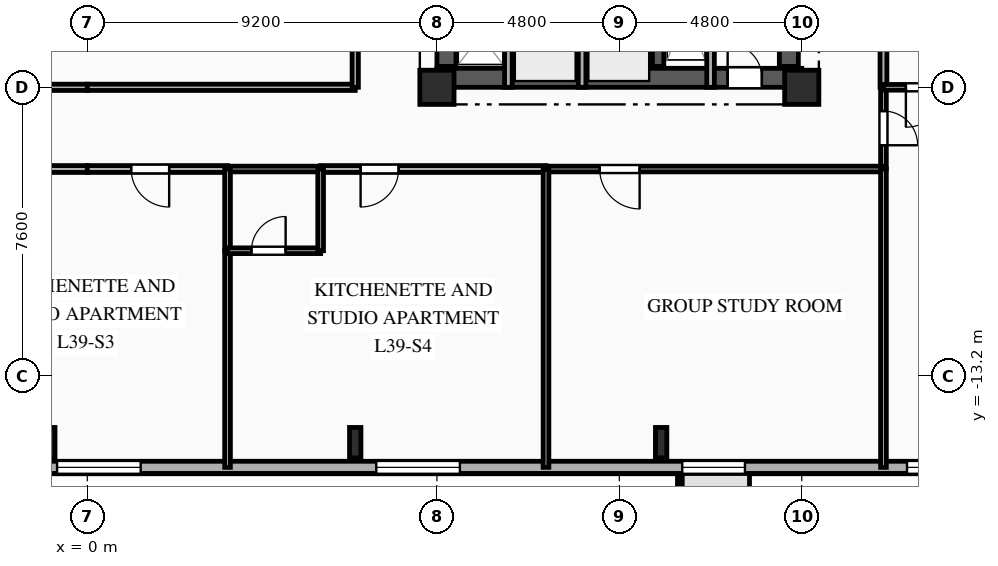
"""IFC4 building model, lengths in metres.
Left out: names, types, materials, properties, quantities, classifications, styles, units other than length and angle.
Written with IfcOpenShell. Run it as: python <this file> out.ifc"""

import sys

from ifc_helpers import new_model, si_unit, direction, frame, frame_2d, origin, origin_2d, place, context, subcontext, project, spatial, rectangle, i_section, extrude, element, fill, save


model = new_model("IFC4")
c1 = context("Model", 3, precision=1e-05, world=origin(), true_north=direction((0.0, 1.0)))
c2 = subcontext(c1, "Body", "Model", "MODEL_VIEW")
j1 = project(units=[si_unit("LENGTHUNIT", "METRE"), si_unit("PLANEANGLEUNIT", "RADIAN")], contexts=[c1])
p1 = place(None, origin())
s1 = spatial("IfcSite", under=j1, at=p1, CompositionType="ELEMENT")
p2 = place(p1, origin())
s2 = spatial("IfcBuilding", under=s1, at=p2, CompositionType="ELEMENT")
p3 = place(p2, frame((0.0, 0.0, 141.05)))
s3 = spatial("IfcBuildingStorey", under=s2, at=p3, CompositionType="ELEMENT", Elevation=141.05)
for number, where, z_axis, x_axis in (
    (1, (9.2, -5.6, 0.0), (0.0, 0.0, 1.0), (1.0, 0.0, 0.0)),
    (2, (18.8, -5.6, 0.0), (0.0, 0.0, 1.0), (1.0, 0.0, 0.0)),
):
    element("IfcColumn", number, at=place(p3, frame(where, z_axis=z_axis, x_axis=x_axis)), inside=s3, PredefinedType="COLUMN", context=c2, shape_type="SweptSolid", body=[
        extrude(rectangle(XDim=0.9, YDim=0.9, at=origin_2d()), origin(), (0.0, 0.0, 1.0), 3.35),
    ])
for number, where, z_axis, x_axis in (
    (3, (-1.0, -14.95, 0.0), (0.0, 0.0, 1.0), (1.0, 0.0, 0.0)),
    (4, (7.05, -14.95, 0.0), (0.0, 0.0, 1.0), (1.0, 0.0, 0.0)),
    (5, (15.1, -14.95, 0.0), (0.0, 0.0, 1.0), (1.0, 0.0, 0.0)),
):
    element("IfcColumn", number, at=place(p3, frame(where, z_axis=z_axis, x_axis=x_axis)), inside=s3, PredefinedType="COLUMN", context=c2, shape_type="SweptSolid", body=[
        extrude(i_section(OverallWidth=0.3, OverallDepth=0.8, WebThickness=0.018, FlangeThickness=0.033, FilletRadius=0.03, at=origin_2d()), origin(), (0.0, 0.0, 1.0), 3.35),
    ])
p4 = place(p3, frame((23.8, -15.6, 0.0), z_axis=(0.0, 0.0, 1.0), x_axis=(-1.0, 0.0, 0.0)))
e6 = element("IfcWall", 6, at=p4, inside=s3, PredefinedType="SOLIDWALL", context=c2, shape_type="SweptSolid", body=[
    extrude(rectangle(XDim=49.6, YDim=0.32, at=frame_2d((24.8, 0.0))), origin(), (0.0, 0.0, 1.0), 3.04),
])
p5 = place(p4, frame((1.13, 0.0, 0.85)))
e7 = element("IfcOpeningElement", 7, at=p5, cuts=e6, PredefinedType="OPENING", context=c2, shape_type="SweptSolid", body=[
    extrude(rectangle(XDim=1.1, YDim=1.85, at=frame_2d((0.55, 0.925))), frame((0.0, 0.17, 0.0), z_axis=(0.0, -1.0, 0.0), x_axis=(1.0, 0.0, 0.0)), (0.0, 0.0, 1.0), 0.34),
])
p6 = place(p4, frame((6.495, 0.0, 0.85)))
e8 = element("IfcOpeningElement", 8, at=p6, cuts=e6, PredefinedType="OPENING", context=c2, shape_type="SweptSolid", body=[
    extrude(rectangle(XDim=1.65, YDim=1.85, at=frame_2d((0.825, 0.925))), frame((0.0, 0.17, 0.0), z_axis=(0.0, -1.0, 0.0), x_axis=(1.0, 0.0, 0.0)), (0.0, 0.0, 1.0), 0.34),
])
p7 = place(p4, frame((13.996, 0.0, 0.85)))
e9 = element("IfcOpeningElement", 9, at=p7, cuts=e6, PredefinedType="OPENING", context=c2, shape_type="SweptSolid", body=[
    extrude(rectangle(XDim=2.2, YDim=1.85, at=frame_2d((1.1, 0.925))), frame((0.0, 0.17, 0.0), z_axis=(0.0, -1.0, 0.0), x_axis=(1.0, 0.0, 0.0)), (0.0, 0.0, 1.0), 0.34),
])
p8 = place(p4, frame((22.396, 0.0, 0.85)))
e10 = element("IfcOpeningElement", 10, at=p8, cuts=e6, PredefinedType="OPENING", context=c2, shape_type="SweptSolid", body=[
    extrude(rectangle(XDim=2.2, YDim=1.85, at=frame_2d((1.1, 0.925))), frame((0.0, 0.17, 0.0), z_axis=(0.0, -1.0, 0.0), x_axis=(1.0, 0.0, 0.0)), (0.0, 0.0, 1.0), 0.34),
])
p9 = place(p4, frame((30.2, 0.0, 0.85)))
e11 = element("IfcOpeningElement", 11, at=p9, cuts=e6, PredefinedType="OPENING", context=c2, shape_type="SweptSolid", body=[
    extrude(rectangle(XDim=2.2, YDim=1.85, at=frame_2d((1.1, 0.925))), frame((0.0, 0.17, 0.0), z_axis=(0.0, -1.0, 0.0), x_axis=(1.0, 0.0, 0.0)), (0.0, 0.0, 1.0), 0.34),
])
p10 = place(p4, frame((38.673, 0.0, 0.85)))
e12 = element("IfcOpeningElement", 12, at=p10, cuts=e6, PredefinedType="OPENING", context=c2, shape_type="SweptSolid", body=[
    extrude(rectangle(XDim=1.65, YDim=1.85, at=frame_2d((0.825, 0.925))), frame((0.0, 0.17, 0.0), z_axis=(0.0, -1.0, 0.0), x_axis=(1.0, 0.0, 0.0)), (0.0, 0.0, 1.0), 0.34),
])
p11 = place(p4, frame((46.175, 0.0, 0.85)))
e13 = element("IfcOpeningElement", 13, at=p11, cuts=e6, PredefinedType="OPENING", context=c2, shape_type="SweptSolid", body=[
    extrude(rectangle(XDim=1.65, YDim=1.85, at=frame_2d((0.825, 0.925))), frame((0.0, 0.17, 0.0), z_axis=(0.0, -1.0, 0.0), x_axis=(1.0, 0.0, 0.0)), (0.0, 0.0, 1.0), 0.34),
])
p12 = place(p3, frame((9.2, -5.35, 0.0), z_axis=(0.0, 0.0, 1.0), x_axis=(1.0, 0.0, 0.0)))
e14 = element("IfcWall", 14, at=p12, inside=s3, PredefinedType="SHEAR", context=c2, shape_type="SweptSolid", body=[
    extrude(rectangle(XDim=9.6, YDim=0.5, at=frame_2d((4.8, 0.0))), origin(), (0.0, 0.0, 1.0), 3.04),
])
p13 = place(p12, frame((7.65, 0.0, 0.0)))
e15 = element("IfcOpeningElement", 15, at=p13, cuts=e14, PredefinedType="OPENING", context=c2, shape_type="SweptSolid", body=[
    extrude(rectangle(XDim=0.9, YDim=2.1, at=frame_2d((0.45, 1.05))), frame((0.0, 0.26, 0.0), z_axis=(0.0, -1.0, 0.0), x_axis=(1.0, 0.0, 0.0)), (0.0, 0.0, 1.0), 0.52),
])
p14 = place(p3, frame((9.45, -5.05, 0.0), z_axis=(0.0, 0.0, 1.0), x_axis=(0.0, 1.0, 0.0)))
e16 = element("IfcWall", 16, at=p14, inside=s3, PredefinedType="SHEAR", context=c2, shape_type="SweptSolid", body=[
    extrude(rectangle(XDim=10.1, YDim=0.5, at=frame_2d((5.05, 0.0))), origin(), (0.0, 0.0, 1.0), 3.04),
])
p15 = place(p14, frame((7.15, 0.0, 0.0)))
e17 = element("IfcOpeningElement", 17, at=p15, cuts=e16, PredefinedType="OPENING", context=c2, shape_type="SweptSolid", body=[
    extrude(rectangle(XDim=0.9, YDim=2.1, at=frame_2d((0.45, 1.05))), frame((0.0, 0.26, 0.0), z_axis=(0.0, -1.0, 0.0), x_axis=(1.0, 0.0, 0.0)), (0.0, 0.0, 1.0), 0.52),
])
p16 = place(p14, frame((2.4, 0.0, 0.0)))
e18 = element("IfcOpeningElement", 18, at=p16, cuts=e16, PredefinedType="OPENING", context=c2, shape_type="SweptSolid", body=[
    extrude(rectangle(XDim=1.2, YDim=2.15, at=frame_2d((0.6, 1.075))), frame((0.0, 0.26, 0.0), z_axis=(0.0, -1.0, 0.0), x_axis=(1.0, 0.0, 0.0)), (0.0, 0.0, 1.0), 0.52),
])
p17 = place(p3, frame((18.46, -5.05, 0.0), z_axis=(0.0, 0.0, 1.0), x_axis=(0.0, 1.0, 0.0)))
e19 = element("IfcWall", 19, at=p17, inside=s3, PredefinedType="SHEAR", context=c2, shape_type="SweptSolid", body=[
    extrude(rectangle(XDim=10.1, YDim=0.5, at=frame_2d((5.05, 0.0))), origin(), (0.0, 0.0, 1.0), 3.04),
])
p18 = place(p3, frame((15.02, -5.05, 0.0), z_axis=(0.0, 0.0, 1.0), x_axis=(0.0, 1.0, 0.0)))
e20 = element("IfcWall", 20, at=p18, inside=s3, PredefinedType="SHEAR", context=c2, shape_type="SweptSolid", body=[
    extrude(rectangle(XDim=10.1, YDim=0.3, at=frame_2d((5.05, 0.0))), origin(), (0.0, 0.0, 1.0), 3.04),
])
p19 = place(p3, frame((16.4, -2.11, 0.0), z_axis=(0.0, 0.0, 1.0), x_axis=(0.0, -1.0, 0.0)))
e21 = element("IfcWall", 21, at=p19, inside=s3, PredefinedType="PARTITIONING", context=c2, shape_type="SweptSolid", body=[
    extrude(rectangle(XDim=3.49, YDim=0.2, at=frame_2d((1.745, 0.0))), origin(), (0.0, 0.0, 1.0), 3.04),
])
for number, where, z_axis, x_axis in (
    (22, (11.08, -5.6, 0.0), (0.0, 0.0, 1.0), (0.0, 1.0, 0.0)),
    (23, (13.02, -5.6, 0.0), (0.0, 0.0, 1.0), (0.0, 1.0, 0.0)),
):
    element("IfcWall", number, at=place(p3, frame(where, z_axis=z_axis, x_axis=x_axis)), inside=s3, PredefinedType="PARTITIONING", context=c2, shape_type="SweptSolid", body=[
        extrude(rectangle(XDim=2.25, YDim=0.2, at=frame_2d((1.125, 0.0))), origin(), (0.0, 0.0, 1.0), 3.04),
    ])
p20 = place(p3, frame((0.0, -7.75, 0.0), z_axis=(0.0, 0.0, 1.0), x_axis=(-1.0, 0.0, 0.0)))
e24 = element("IfcWall", 24, at=p20, inside=s3, PredefinedType="PARTITIONING", context=c2, shape_type="SweptSolid", body=[
    extrude(rectangle(XDim=2.24, YDim=0.18, at=frame_2d((1.12, 0.0))), origin(), (0.0, 0.0, 1.0), 3.04),
])
p21 = place(p3, frame((-7.05, -5.6, 0.0), z_axis=(0.0, 0.0, 1.0), x_axis=(1.0, 0.0, 0.0)))
e25 = element("IfcWall", 25, at=p21, inside=s3, PredefinedType="PARTITIONING", context=c2, shape_type="SweptSolid", body=[
    extrude(rectangle(XDim=7.05, YDim=0.165, at=frame_2d((3.525, 0.0))), origin(), (0.0, 0.0, 1.0), 2.525),
])
p22 = place(p3, frame((20.95, -5.6, 0.0), z_axis=(0.0, 0.0, 1.0), x_axis=(0.0, -1.0, 0.0)))
e26 = element("IfcWall", 26, at=p22, inside=s3, PredefinedType="PARTITIONING", context=c2, shape_type="SweptSolid", body=[
    extrude(rectangle(XDim=2.15, YDim=0.15, at=frame_2d((1.075, 0.0))), origin(), (0.0, 0.0, 1.0), 3.04),
])
p23 = place(p22, frame((0.625, 0.0, 0.0)))
e27 = element("IfcOpeningElement", 27, at=p23, cuts=e26, PredefinedType="OPENING", context=c2, shape_type="SweptSolid", body=[
    extrude(rectangle(XDim=0.9, YDim=2.1, at=frame_2d((0.45, 1.05))), frame((0.0, 0.085, 0.0), z_axis=(0.0, -1.0, 0.0), x_axis=(1.0, 0.0, 0.0)), (0.0, 0.0, 1.0), 0.17),
])
p24 = place(p3, frame((3.69, -7.75, 0.0), z_axis=(0.0, 0.0, 1.0), x_axis=(-1.0, 0.0, 0.0)))
e28 = element("IfcWall", 28, at=p24, inside=s3, PredefinedType="PARTITIONING", context=c2, shape_type="SweptSolid", body=[
    extrude(rectangle(XDim=3.69, YDim=0.18, at=frame_2d((1.845, 0.0))), origin(), (0.0, 0.0, 1.0), 3.04),
])
p25 = place(p24, frame((1.536, 0.0, 0.0)))
e29 = element("IfcOpeningElement", 29, at=p25, cuts=e28, PredefinedType="OPENING", context=c2, shape_type="SweptSolid", body=[
    extrude(rectangle(XDim=1.0, YDim=2.15, at=frame_2d((0.5, 1.075))), frame((0.0, 0.1, 0.0), z_axis=(0.0, -1.0, 0.0), x_axis=(1.0, 0.0, 0.0)), (0.0, 0.0, 1.0), 0.2),
])
p26 = place(p3, frame((12.07, -7.75, 0.0), z_axis=(0.0, 0.0, 1.0), x_axis=(-1.0, 0.0, 0.0)))
e30 = element("IfcWall", 30, at=p26, inside=s3, PredefinedType="PARTITIONING", context=c2, shape_type="SweptSolid", body=[
    extrude(rectangle(XDim=5.93, YDim=0.18, at=frame_2d((2.965, 0.0))), origin(), (0.0, 0.0, 1.0), 3.04),
])
p27 = place(p26, frame((3.879, 0.0, 0.0)))
e31 = element("IfcOpeningElement", 31, at=p27, cuts=e30, PredefinedType="OPENING", context=c2, shape_type="SweptSolid", body=[
    extrude(rectangle(XDim=1.0, YDim=2.15, at=frame_2d((0.5, 1.075))), frame((0.0, 0.1, 0.0), z_axis=(0.0, -1.0, 0.0), x_axis=(1.0, 0.0, 0.0)), (0.0, 0.0, 1.0), 0.2),
])
p28 = place(p3, frame((6.14, -7.75, 0.0), z_axis=(0.0, 0.0, 1.0), x_axis=(-1.0, 0.0, 0.0)))
e32 = element("IfcWall", 32, at=p28, inside=s3, PredefinedType="PLUMBINGWALL", context=c2, shape_type="SweptSolid", body=[
    extrude(rectangle(XDim=2.45, YDim=0.15, at=frame_2d((1.225, 0.0))), origin(), (0.0, 0.0, 1.0), 3.04),
])
p29 = place(p3, frame((20.95, -7.75, 0.0), z_axis=(0.0, 0.0, 1.0), x_axis=(-1.0, 0.0, 0.0)))
e33 = element("IfcWall", 33, at=p29, inside=s3, PredefinedType="PARTITIONING", context=c2, shape_type="SweptSolid", body=[
    extrude(rectangle(XDim=8.88, YDim=0.15, at=frame_2d((4.44, 0.0))), origin(), (0.0, 0.0, 1.0), 3.04),
])
p30 = place(p29, frame((6.416, 0.0, 0.0)))
e34 = element("IfcOpeningElement", 34, at=p30, cuts=e33, PredefinedType="OPENING", context=c2, shape_type="SweptSolid", body=[
    extrude(rectangle(XDim=1.05, YDim=2.15, at=frame_2d((0.525, 1.075))), frame((0.0, 0.085, 0.0), z_axis=(0.0, -1.0, 0.0), x_axis=(1.0, 0.0, 0.0)), (0.0, 0.0, 1.0), 0.17),
])
p31 = place(p3, frame((0.0, -5.6, 0.0), z_axis=(0.0, 0.0, 1.0), x_axis=(1.0, 0.0, 0.0)))
e35 = element("IfcWall", 35, at=p31, inside=s3, PredefinedType="PARTITIONING", context=c2, shape_type="SweptSolid", body=[
    extrude(rectangle(XDim=7.05, YDim=0.165, at=frame_2d((3.525, 0.0))), origin(), (0.0, 0.0, 1.0), 2.525),
])
p32 = place(p3, frame((20.95, 8.5, 0.0), z_axis=(0.0, 0.0, 1.0), x_axis=(0.0, -1.0, 0.0)))
e36 = element("IfcWall", 36, at=p32, inside=s3, PredefinedType="PARTITIONING", context=c2, shape_type="SweptSolid", body=[
    extrude(rectangle(XDim=14.1, YDim=0.18, at=frame_2d((7.05, 0.0))), origin(), (0.0, 0.0, 1.0), 3.04),
])
p33 = place(p32, frame((8.042, 0.0, 0.0)))
e37 = element("IfcOpeningElement", 37, at=p33, cuts=e36, PredefinedType="OPENING", context=c2, shape_type="SweptSolid", body=[
    extrude(rectangle(XDim=1.0, YDim=2.15, at=frame_2d((0.5, 1.075))), frame((0.0, 0.1, 0.0), z_axis=(0.0, -1.0, 0.0), x_axis=(1.0, 0.0, 0.0)), (0.0, 0.0, 1.0), 0.2),
])
p34 = place(p3, frame((7.05, -5.6, 0.0), z_axis=(0.0, 0.0, 1.0), x_axis=(0.0, 1.0, 0.0)))
e38 = element("IfcWall", 38, at=p34, inside=s3, PredefinedType="PARTITIONING", context=c2, shape_type="SweptSolid", body=[
    extrude(rectangle(XDim=2.65, YDim=0.165, at=frame_2d((1.325, 0.0))), origin(), (0.0, 0.0, 1.0), 3.04),
])
p35 = place(p3, frame((23.18, -5.6, 0.0), z_axis=(0.0, 0.0, 1.0), x_axis=(-1.0, 0.0, 0.0)))
e39 = element("IfcWall", 39, at=p35, inside=s3, PredefinedType="PARTITIONING", context=c2, shape_type="SweptSolid", body=[
    extrude(rectangle(XDim=2.23, YDim=0.15, at=frame_2d((1.115, 0.0))), origin(), (0.0, 0.0, 1.0), 3.04),
])
p36 = place(p35, frame((0.59, 0.0, 0.0)))
e40 = element("IfcOpeningElement", 40, at=p36, cuts=e39, PredefinedType="OPENING", context=c2, shape_type="SweptSolid", body=[
    extrude(rectangle(XDim=1.05, YDim=2.15, at=frame_2d((0.525, 1.075))), frame((0.0, 0.085, 0.0), z_axis=(0.0, -1.0, 0.0), x_axis=(1.0, 0.0, 0.0)), (0.0, 0.0, 1.0), 0.17),
])
p37 = place(p3, frame((20.95, -15.6, 0.0), z_axis=(0.0, 0.0, 1.0), x_axis=(0.0, 1.0, 0.0)))
e41 = element("IfcWall", 41, at=p37, inside=s3, PredefinedType="PARTITIONING", context=c2, shape_type="SweptSolid", body=[
    extrude(rectangle(XDim=7.85, YDim=0.15, at=frame_2d((3.925, 0.0))), origin(), (0.0, 0.0, 1.0), 3.04),
])
p38 = place(p3, frame((3.69, -9.9, 0.0), z_axis=(0.0, 0.0, 1.0), x_axis=(0.0, -1.0, 0.0)))
e42 = element("IfcWall", 42, at=p38, inside=s3, PredefinedType="PARTITIONING", context=c2, shape_type="SweptSolid", body=[
    extrude(rectangle(XDim=5.7, YDim=0.15, at=frame_2d((2.85, 0.0))), origin(), (0.0, 0.0, 1.0), 3.04),
])
p39 = place(p3, frame((3.69, -7.75, 0.0), z_axis=(0.0, 0.0, 1.0), x_axis=(0.0, -1.0, 0.0)))
e43 = element("IfcWall", 43, at=p39, inside=s3, PredefinedType="PLUMBINGWALL", context=c2, shape_type="SweptSolid", body=[
    extrude(rectangle(XDim=2.15, YDim=0.15, at=frame_2d((1.075, 0.0))), origin(), (0.0, 0.0, 1.0), 3.04),
])
p40 = place(p3, frame((3.69, -9.9, 0.0), z_axis=(0.0, 0.0, 1.0), x_axis=(1.0, 0.0, 0.0)))
e44 = element("IfcWall", 44, at=p40, inside=s3, PredefinedType="PLUMBINGWALL", context=c2, shape_type="SweptSolid", body=[
    extrude(rectangle(XDim=2.45, YDim=0.15, at=frame_2d((1.225, 0.0))), origin(), (0.0, 0.0, 1.0), 3.04),
])
p41 = place(p40, frame((0.629, 0.0, 0.0)))
e45 = element("IfcOpeningElement", 45, at=p41, cuts=e44, PredefinedType="OPENING", context=c2, shape_type="SweptSolid", body=[
    extrude(rectangle(XDim=0.9, YDim=2.1, at=frame_2d((0.45, 1.05))), frame((0.0, 0.085, 0.0), z_axis=(0.0, -1.0, 0.0), x_axis=(1.0, 0.0, 0.0)), (0.0, 0.0, 1.0), 0.17),
])
p42 = place(p3, frame((6.14, -9.9, 0.0), z_axis=(0.0, 0.0, 1.0), x_axis=(0.0, 1.0, 0.0)))
e46 = element("IfcWall", 46, at=p42, inside=s3, PredefinedType="PLUMBINGWALL", context=c2, shape_type="SweptSolid", body=[
    extrude(rectangle(XDim=2.15, YDim=0.15, at=frame_2d((1.075, 0.0))), origin(), (0.0, 0.0, 1.0), 3.04),
])
p43 = place(p3, frame((12.07, -7.75, 0.0), z_axis=(0.0, 0.0, 1.0), x_axis=(0.0, -1.0, 0.0)))
e47 = element("IfcWall", 47, at=p43, inside=s3, PredefinedType="PARTITIONING", context=c2, shape_type="SweptSolid", body=[
    extrude(rectangle(XDim=7.85, YDim=0.15, at=frame_2d((3.925, 0.0))), origin(), (0.0, 0.0, 1.0), 3.04),
])
p44 = place(p5, origin())
e48 = element("IfcWindow", 48, at=p44, inside=s3, PartitioningType="SINGLE_PANEL", PredefinedType="WINDOW", context=c2, shape_type="SweptSolid", body=[
    extrude(rectangle(XDim=1.1, YDim=1.85, at=frame_2d((0.55, 0.925))), frame((0.0, 0.03, 0.0), z_axis=(0.0, -1.0, 0.0), x_axis=(1.0, 0.0, 0.0)), (0.0, 0.0, 1.0), 0.06),
])
fill(e7, e48)
p45 = place(p6, origin())
e49 = element("IfcWindow", 49, at=p45, inside=s3, PartitioningType="SINGLE_PANEL", PredefinedType="WINDOW", context=c2, shape_type="SweptSolid", body=[
    extrude(rectangle(XDim=1.65, YDim=1.85, at=frame_2d((0.825, 0.925))), frame((0.0, 0.03, 0.0), z_axis=(0.0, -1.0, 0.0), x_axis=(1.0, 0.0, 0.0)), (0.0, 0.0, 1.0), 0.06),
])
fill(e8, e49)
p46 = place(p7, origin())
e50 = element("IfcWindow", 50, at=p46, inside=s3, PartitioningType="SINGLE_PANEL", PredefinedType="WINDOW", context=c2, shape_type="SweptSolid", body=[
    extrude(rectangle(XDim=2.2, YDim=1.85, at=frame_2d((1.1, 0.925))), frame((0.0, 0.03, 0.0), z_axis=(0.0, -1.0, 0.0), x_axis=(1.0, 0.0, 0.0)), (0.0, 0.0, 1.0), 0.06),
])
fill(e9, e50)
p47 = place(p8, origin())
e51 = element("IfcWindow", 51, at=p47, inside=s3, PartitioningType="SINGLE_PANEL", PredefinedType="WINDOW", context=c2, shape_type="SweptSolid", body=[
    extrude(rectangle(XDim=2.2, YDim=1.85, at=frame_2d((1.1, 0.925))), frame((0.0, 0.03, 0.0), z_axis=(0.0, -1.0, 0.0), x_axis=(1.0, 0.0, 0.0)), (0.0, 0.0, 1.0), 0.06),
])
fill(e10, e51)
p48 = place(p13, origin())
e52 = element("IfcDoor", 52, at=p48, inside=s3, OperationType="SINGLE_SWING_LEFT", PredefinedType="DOOR", context=c2, shape_type="SweptSolid", body=[
    extrude(rectangle(XDim=0.9, YDim=2.1, at=frame_2d((0.45, 1.05))), frame((0.0, 0.025, 0.0), z_axis=(0.0, -1.0, 0.0), x_axis=(1.0, 0.0, 0.0)), (0.0, 0.0, 1.0), 0.05),
])
fill(e15, e52)
p49 = place(p23, origin())
e53 = element("IfcDoor", 53, at=p49, inside=s3, OperationType="SINGLE_SWING_RIGHT", PredefinedType="DOOR", context=c2, shape_type="SweptSolid", body=[
    extrude(rectangle(XDim=0.9, YDim=2.1, at=frame_2d((0.45, 1.05))), frame((0.0, 0.025, 0.0), z_axis=(0.0, -1.0, 0.0), x_axis=(1.0, 0.0, 0.0)), (0.0, 0.0, 1.0), 0.05),
])
fill(e27, e53)
p50 = place(p25, origin())
e54 = element("IfcDoor", 54, at=p50, inside=s3, OperationType="SINGLE_SWING_LEFT", PredefinedType="DOOR", context=c2, shape_type="SweptSolid", body=[
    extrude(rectangle(XDim=1.0, YDim=2.15, at=frame_2d((0.5, 1.075))), frame((0.0, 0.025, 0.0), z_axis=(0.0, -1.0, 0.0), x_axis=(1.0, 0.0, 0.0)), (0.0, 0.0, 1.0), 0.05),
])
fill(e29, e54)
p51 = place(p27, origin())
e55 = element("IfcDoor", 55, at=p51, inside=s3, OperationType="SINGLE_SWING_RIGHT", PredefinedType="DOOR", context=c2, shape_type="SweptSolid", body=[
    extrude(rectangle(XDim=1.0, YDim=2.15, at=frame_2d((0.5, 1.075))), frame((0.0, 0.025, 0.0), z_axis=(0.0, -1.0, 0.0), x_axis=(1.0, 0.0, 0.0)), (0.0, 0.0, 1.0), 0.05),
])
fill(e31, e55)
p52 = place(p30, origin())
e56 = element("IfcDoor", 56, at=p52, inside=s3, OperationType="SINGLE_SWING_LEFT", PredefinedType="DOOR", context=c2, shape_type="SweptSolid", body=[
    extrude(rectangle(XDim=1.05, YDim=2.15, at=frame_2d((0.525, 1.075))), frame((0.0, 0.025, 0.0), z_axis=(0.0, -1.0, 0.0), x_axis=(1.0, 0.0, 0.0)), (0.0, 0.0, 1.0), 0.05),
])
fill(e34, e56)
p53 = place(p36, origin())
e57 = element("IfcDoor", 57, at=p53, inside=s3, OperationType="SINGLE_SWING_RIGHT", PredefinedType="DOOR", context=c2, shape_type="SweptSolid", body=[
    extrude(rectangle(XDim=1.05, YDim=2.15, at=frame_2d((0.525, 1.075))), frame((0.0, 0.025, 0.0), z_axis=(0.0, -1.0, 0.0), x_axis=(1.0, 0.0, 0.0)), (0.0, 0.0, 1.0), 0.05),
])
fill(e40, e57)
p54 = place(p41, origin())
e58 = element("IfcDoor", 58, at=p54, inside=s3, OperationType="SINGLE_SWING_RIGHT", PredefinedType="DOOR", context=c2, shape_type="SweptSolid", body=[
    extrude(rectangle(XDim=0.9, YDim=2.1, at=frame_2d((0.45, 1.05))), frame((0.0, 0.025, 0.0), z_axis=(0.0, -1.0, 0.0), x_axis=(1.0, 0.0, 0.0)), (0.0, 0.0, 1.0), 0.05),
])
fill(e45, e58)
save(model, sys.argv[1])
